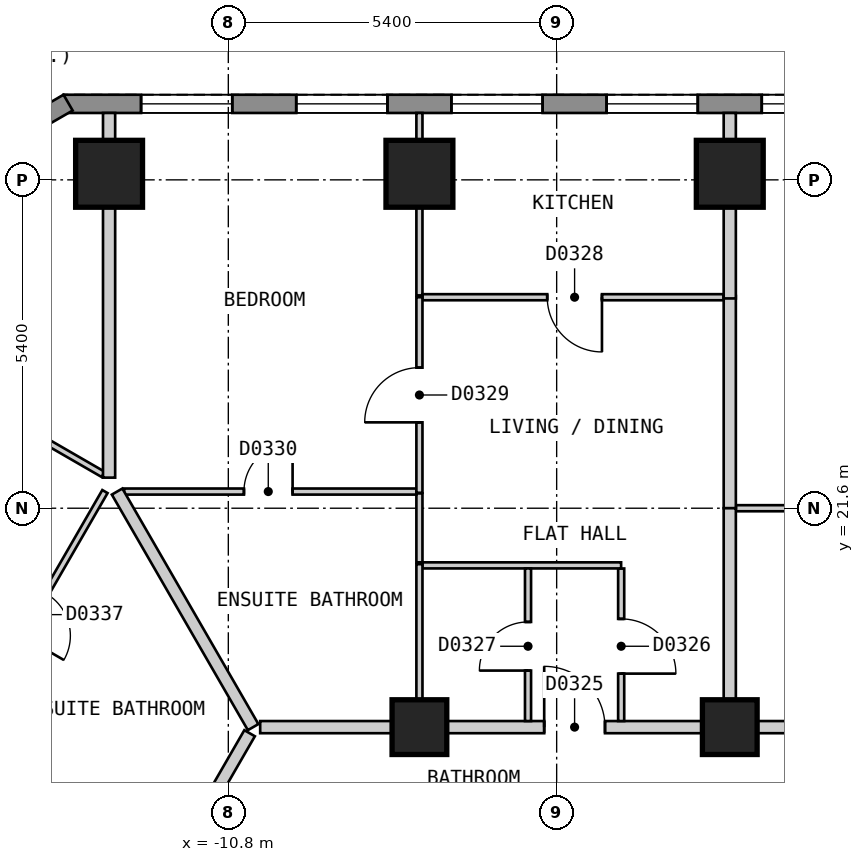
"""IFC4 building model, lengths in metres.
Left out: names, types, materials, properties, quantities, classifications, styles, units other than length and angle.
Written with IfcOpenShell. Run it as: python <this file> out.ifc"""

import sys

from ifc_helpers import new_model, si_unit, direction, frame, frame_2d, origin, origin_2d, place, context, subcontext, project, spatial, polyline, rectangle, outline, extrude, element, fill, save


model = new_model("IFC4")
c1 = context("Model", 3, precision=1e-05, world=origin(), true_north=direction((0.0, 1.0)))
c2 = subcontext(c1, "Body", "Model", "MODEL_VIEW")
j1 = project(units=[si_unit("LENGTHUNIT", "METRE"), si_unit("PLANEANGLEUNIT", "RADIAN")], contexts=[c1])
p1 = place(None, origin())
s1 = spatial("IfcSite", under=j1, at=p1, CompositionType="ELEMENT")
p2 = place(p1, origin())
s2 = spatial("IfcBuilding", under=s1, at=p2, CompositionType="ELEMENT")
p3 = place(p2, frame((0.0, 0.0, 59.4)))
s3 = spatial("IfcBuildingStorey", under=s2, at=p3, CompositionType="ELEMENT", Elevation=59.4)
for number, where, z_axis, x_axis in (
    (1, (-2.553, 27.1, 0.0), (0.0, 0.0, 1.0), (-1.0, 0.0, 0.0)),
    (2, (-7.657, 27.1, 0.0), (0.0, 0.0, 1.0), (-1.0, 0.0, 0.0)),
    (3, (-12.761, 27.1, 0.0), (0.0, 0.0, 1.0), (-1.0, 0.0, 0.0)),
):
    element("IfcColumn", number, at=place(p3, frame(where, z_axis=z_axis, x_axis=x_axis)), inside=s3, PredefinedType="COLUMN", context=c2, shape_type="SweptSolid", body=[
        extrude(rectangle(XDim=1.1, YDim=1.1, at=origin_2d()), origin(), (0.0, 0.0, 1.0), 3.0),
    ])
for number, where, z_axis, x_axis in (
    (4, (-2.553, 18.0, 0.0), (0.0, 0.0, 1.0), (-1.0, 0.0, 0.0)),
    (5, (-7.657, 18.0, 0.0), (0.0, 0.0, 1.0), (-1.0, 0.0, 0.0)),
):
    element("IfcColumn", number, at=place(p3, frame(where, z_axis=z_axis, x_axis=x_axis)), inside=s3, PredefinedType="COLUMN", context=c2, shape_type="SweptSolid", body=[
        extrude(rectangle(XDim=0.9, YDim=0.9, at=origin_2d()), origin(), (0.0, 0.0, 1.0), 3.0),
    ])
p4 = place(p3, frame((13.51, 28.25, 0.0), z_axis=(0.0, 0.0, 1.0), x_axis=(-1.0, 0.0, 0.0)))
e6 = element("IfcWall", 6, at=p4, inside=s3, PredefinedType="SOLIDWALL", context=c2, shape_type="SweptSolid", body=[
    extrude(outline(polyline([(0.0, -0.15), (27.02, -0.15), (26.94, 0.15), (0.08, 0.15), (0.0, -0.15)])), origin(), (0.0, 0.0, 1.0), 2.6),
])
p5 = place(p4, frame((1.277, 0.0, 0.15)))
e7 = element("IfcOpeningElement", 7, at=p5, cuts=e6, PredefinedType="OPENING", context=c2, shape_type="SweptSolid", body=[
    extrude(rectangle(XDim=1.5, YDim=2.1, at=frame_2d((0.75, 1.05))), frame((0.0, 0.16, 0.0), z_axis=(0.0, -1.0, 0.0), x_axis=(1.0, 0.0, 0.0)), (0.0, 0.0, 1.0), 0.32),
])
p6 = place(p4, frame((3.829, 0.0, 0.15)))
e8 = element("IfcOpeningElement", 8, at=p6, cuts=e6, PredefinedType="OPENING", context=c2, shape_type="SweptSolid", body=[
    extrude(rectangle(XDim=1.5, YDim=2.1, at=frame_2d((0.75, 1.05))), frame((0.0, 0.16, 0.0), z_axis=(0.0, -1.0, 0.0), x_axis=(1.0, 0.0, 0.0)), (0.0, 0.0, 1.0), 0.32),
])
p7 = place(p4, frame((6.381, 0.0, 0.15)))
e9 = element("IfcOpeningElement", 9, at=p7, cuts=e6, PredefinedType="OPENING", context=c2, shape_type="SweptSolid", body=[
    extrude(rectangle(XDim=1.5, YDim=2.1, at=frame_2d((0.75, 1.05))), frame((0.0, 0.16, 0.0), z_axis=(0.0, -1.0, 0.0), x_axis=(1.0, 0.0, 0.0)), (0.0, 0.0, 1.0), 0.32),
])
p8 = place(p4, frame((8.933, 0.0, 0.15)))
e10 = element("IfcOpeningElement", 10, at=p8, cuts=e6, PredefinedType="OPENING", context=c2, shape_type="SweptSolid", body=[
    extrude(rectangle(XDim=1.5, YDim=2.1, at=frame_2d((0.75, 1.05))), frame((0.0, 0.16, 0.0), z_axis=(0.0, -1.0, 0.0), x_axis=(1.0, 0.0, 0.0)), (0.0, 0.0, 1.0), 0.32),
])
p9 = place(p4, frame((11.485, 0.0, 0.15)))
e11 = element("IfcOpeningElement", 11, at=p9, cuts=e6, PredefinedType="OPENING", context=c2, shape_type="SweptSolid", body=[
    extrude(rectangle(XDim=1.5, YDim=2.1, at=frame_2d((0.75, 1.05))), frame((0.0, 0.16, 0.0), z_axis=(0.0, -1.0, 0.0), x_axis=(1.0, 0.0, 0.0)), (0.0, 0.0, 1.0), 0.32),
])
p10 = place(p4, frame((14.037, 0.0, 0.15)))
e12 = element("IfcOpeningElement", 12, at=p10, cuts=e6, PredefinedType="OPENING", context=c2, shape_type="SweptSolid", body=[
    extrude(rectangle(XDim=1.5, YDim=2.1, at=frame_2d((0.75, 1.05))), frame((0.0, 0.16, 0.0), z_axis=(0.0, -1.0, 0.0), x_axis=(1.0, 0.0, 0.0)), (0.0, 0.0, 1.0), 0.32),
])
p11 = place(p4, frame((16.589, 0.0, 0.15)))
e13 = element("IfcOpeningElement", 13, at=p11, cuts=e6, PredefinedType="OPENING", context=c2, shape_type="SweptSolid", body=[
    extrude(rectangle(XDim=1.5, YDim=2.1, at=frame_2d((0.75, 1.05))), frame((0.0, 0.16, 0.0), z_axis=(0.0, -1.0, 0.0), x_axis=(1.0, 0.0, 0.0)), (0.0, 0.0, 1.0), 0.32),
])
p12 = place(p4, frame((19.141, 0.0, 0.15)))
e14 = element("IfcOpeningElement", 14, at=p12, cuts=e6, PredefinedType="OPENING", context=c2, shape_type="SweptSolid", body=[
    extrude(rectangle(XDim=1.5, YDim=2.1, at=frame_2d((0.75, 1.05))), frame((0.0, 0.16, 0.0), z_axis=(0.0, -1.0, 0.0), x_axis=(1.0, 0.0, 0.0)), (0.0, 0.0, 1.0), 0.32),
])
p13 = place(p4, frame((21.693, 0.0, 0.15)))
e15 = element("IfcOpeningElement", 15, at=p13, cuts=e6, PredefinedType="OPENING", context=c2, shape_type="SweptSolid", body=[
    extrude(rectangle(XDim=1.5, YDim=2.1, at=frame_2d((0.75, 1.05))), frame((0.0, 0.16, 0.0), z_axis=(0.0, -1.0, 0.0), x_axis=(1.0, 0.0, 0.0)), (0.0, 0.0, 1.0), 0.32),
])
p14 = place(p4, frame((24.245, 0.0, 0.15)))
e16 = element("IfcOpeningElement", 16, at=p14, cuts=e6, PredefinedType="OPENING", context=c2, shape_type="SweptSolid", body=[
    extrude(rectangle(XDim=1.5, YDim=2.1, at=frame_2d((0.75, 1.05))), frame((0.0, 0.16, 0.0), z_axis=(0.0, -1.0, 0.0), x_axis=(1.0, 0.0, 0.0)), (0.0, 0.0, 1.0), 0.32),
])
p15 = place(p3, frame((-13.435, 28.27, 0.0), z_axis=(0.0, 0.0, 1.0), x_axis=(-0.866010750942, -0.50002537861, 0.0)))
e17 = element("IfcWall", 17, at=p15, inside=s3, PredefinedType="SOLIDWALL", context=c2, shape_type="SweptSolid", body=[
    extrude(outline(polyline([(0.0, -0.15), (5.0, -0.15), (4.919, 0.15), (0.08, 0.15), (0.0, -0.15)])), origin(), (0.0, 0.0, 1.0), 2.6),
])
p16 = place(p15, frame((0.65, 0.0, 0.15)))
e18 = element("IfcOpeningElement", 18, at=p16, cuts=e17, PredefinedType="OPENING", context=c2, shape_type="SweptSolid", body=[
    extrude(rectangle(XDim=1.2, YDim=2.1, at=frame_2d((0.6, 1.05))), frame((0.0, 0.16, 0.0), z_axis=(0.0, -1.0, 0.0), x_axis=(1.0, 0.0, 0.0)), (0.0, 0.0, 1.0), 0.32),
])
p17 = place(p15, frame((3.149, 0.0, 0.15)))
e19 = element("IfcOpeningElement", 19, at=p17, cuts=e17, PredefinedType="OPENING", context=c2, shape_type="SweptSolid", body=[
    extrude(rectangle(XDim=1.2, YDim=2.1, at=frame_2d((0.6, 1.05))), frame((0.0, 0.16, 0.0), z_axis=(0.0, -1.0, 0.0), x_axis=(1.0, 0.0, 0.0)), (0.0, 0.0, 1.0), 0.32),
])
p18 = place(p3, frame((-10.276, 18.0, 0.0), z_axis=(0.0, 0.0, 1.0), x_axis=(1.0, 0.0, 0.0)))
e20 = element("IfcWall", 20, at=p18, inside=s3, PredefinedType="PARTITIONING", context=c2, shape_type="SweptSolid", body=[
    extrude(rectangle(XDim=20.5, YDim=0.2, at=frame_2d((10.25, 0.0))), origin(), (0.0, 0.0, 1.0), 2.6),
])
p19 = place(p18, frame((19.264, 0.0, 0.0)))
e21 = element("IfcOpeningElement", 21, at=p19, cuts=e20, PredefinedType="OPENING", context=c2, shape_type="SweptSolid", body=[
    extrude(rectangle(XDim=1.0, YDim=2.1, at=frame_2d((0.5, 1.05))), frame((0.0, 0.11, 0.0), z_axis=(0.0, -1.0, 0.0), x_axis=(1.0, 0.0, 0.0)), (0.0, 0.0, 1.0), 0.22),
])
p20 = place(p18, frame((14.879, 0.0, 0.0)))
e22 = element("IfcOpeningElement", 22, at=p20, cuts=e20, PredefinedType="OPENING", context=c2, shape_type="SweptSolid", body=[
    extrude(rectangle(XDim=1.0, YDim=2.1, at=frame_2d((0.5, 1.05))), frame((0.0, 0.11, 0.0), z_axis=(0.0, -1.0, 0.0), x_axis=(1.0, 0.0, 0.0)), (0.0, 0.0, 1.0), 0.22),
])
p21 = place(p18, frame((4.671, 0.0, 0.0)))
e23 = element("IfcOpeningElement", 23, at=p21, cuts=e20, PredefinedType="OPENING", context=c2, shape_type="SweptSolid", body=[
    extrude(rectangle(XDim=1.0, YDim=2.1, at=frame_2d((0.5, 1.05))), frame((0.0, 0.11, 0.0), z_axis=(0.0, -1.0, 0.0), x_axis=(1.0, 0.0, 0.0)), (0.0, 0.0, 1.0), 0.22),
])
p22 = place(p3, frame((-20.727, 0.099, 0.0), z_axis=(0.0, 0.0, 1.0), x_axis=(0.499993204491, 0.866029327138, 0.0)))
e24 = element("IfcWall", 24, at=p22, inside=s3, PredefinedType="PARTITIONING", context=c2, shape_type="SweptSolid", body=[
    extrude(rectangle(XDim=20.554, YDim=0.2, at=frame_2d((10.277, 0.0))), origin(), (0.0, 0.0, 1.0), 2.6),
])
p23 = place(p22, frame((14.88, 0.0, 0.0)))
e25 = element("IfcOpeningElement", 25, at=p23, cuts=e24, PredefinedType="OPENING", context=c2, shape_type="SweptSolid", body=[
    extrude(rectangle(XDim=1.0, YDim=2.1, at=frame_2d((0.5, 1.05))), frame((0.0, 0.11, 0.0), z_axis=(0.0, -1.0, 0.0), x_axis=(1.0, 0.0, 0.0)), (0.0, 0.0, 1.0), 0.22),
])
p24 = place(p22, frame((4.673, 0.0, 0.0)))
e26 = element("IfcOpeningElement", 26, at=p24, cuts=e24, PredefinedType="OPENING", context=c2, shape_type="SweptSolid", body=[
    extrude(rectangle(XDim=1.0, YDim=2.1, at=frame_2d((0.5, 1.05))), frame((0.0, 0.11, 0.0), z_axis=(0.0, -1.0, 0.0), x_axis=(1.0, 0.0, 0.0)), (0.0, 0.0, 1.0), 0.22),
])
p25 = place(p22, frame((0.838, 0.0, 0.0)))
e27 = element("IfcOpeningElement", 27, at=p25, cuts=e24, PredefinedType="OPENING", context=c2, shape_type="SweptSolid", body=[
    extrude(rectangle(XDim=0.8, YDim=2.1, at=frame_2d((0.4, 1.05))), frame((0.0, 0.11, 0.0), z_axis=(0.0, -1.0, 0.0), x_axis=(1.0, 0.0, 0.0)), (0.0, 0.0, 1.0), 0.22),
])
p26 = place(p3, frame((-4.339, 20.609, 0.0), z_axis=(0.0, 0.0, 1.0), x_axis=(0.0, -1.0, 0.0)))
e28 = element("IfcWall", 28, at=p26, inside=s3, PredefinedType="PARTITIONING", context=c2, shape_type="SweptSolid", body=[
    extrude(rectangle(XDim=2.509, YDim=0.1, at=frame_2d((1.254, 0.0))), origin(), (0.0, 0.0, 1.0), 2.6),
])
p27 = place(p26, frame((0.829, 0.0, 0.0)))
e29 = element("IfcOpeningElement", 29, at=p27, cuts=e28, PredefinedType="OPENING", context=c2, shape_type="SweptSolid", body=[
    extrude(rectangle(XDim=0.9, YDim=2.1, at=frame_2d((0.45, 1.05))), frame((0.0, 0.06, 0.0), z_axis=(0.0, -1.0, 0.0), x_axis=(1.0, 0.0, 0.0)), (0.0, 0.0, 1.0), 0.12),
])
p28 = place(p3, frame((-7.657, 28.1, 0.0), z_axis=(0.0, 0.0, 1.0), x_axis=(0.0, -1.0, 0.0)))
e30 = element("IfcWall", 30, at=p28, inside=s3, PredefinedType="PARTITIONING", context=c2, shape_type="SweptSolid", body=[
    extrude(rectangle(XDim=3.0, YDim=0.1, at=frame_2d((1.5, 0.0))), origin(), (0.0, 0.0, 1.0), 2.6),
])
p29 = place(p3, frame((-7.657, 21.844, 0.0), z_axis=(0.0, 0.0, 1.0), x_axis=(0.0, -1.0, 0.0)))
e31 = element("IfcWall", 31, at=p29, inside=s3, PredefinedType="PARTITIONING", context=c2, shape_type="SweptSolid", body=[
    extrude(rectangle(XDim=1.134, YDim=0.1, at=frame_2d((0.567, 0.0))), origin(), (0.0, 0.0, 1.0), 2.6),
])
p30 = place(p3, frame((-20.508, 20.679, 0.0), z_axis=(0.0, 0.0, 1.0), x_axis=(0.866047370643, -0.499961950354, 0.0)))
e32 = element("IfcWall", 32, at=p30, inside=s3, PredefinedType="PARTITIONING", context=c2, shape_type="SweptSolid", body=[
    extrude(rectangle(XDim=10.001, YDim=0.1, at=frame_2d((5.0, 0.0))), origin(), (0.0, 0.0, 1.0), 2.6),
])
p31 = place(p30, frame((2.576, 0.0, 0.0)))
e33 = element("IfcOpeningElement", 33, at=p31, cuts=e32, PredefinedType="OPENING", context=c2, shape_type="SweptSolid", body=[
    extrude(rectangle(XDim=0.9, YDim=2.1, at=frame_2d((0.45, 1.05))), frame((0.0, 0.06, 0.0), z_axis=(0.0, -1.0, 0.0), x_axis=(1.0, 0.0, 0.0)), (0.0, 0.0, 1.0), 0.12),
])
p32 = place(p3, frame((-17.955, 25.099, 0.0), z_axis=(0.0, 0.0, 1.0), x_axis=(0.866036353684, -0.499981033738, 0.0)))
e34 = element("IfcWall", 34, at=p32, inside=s3, PredefinedType="PARTITIONING", context=c2, shape_type="SweptSolid", body=[
    extrude(rectangle(XDim=5.885, YDim=0.1, at=frame_2d((2.942, 0.0))), origin(), (0.0, 0.0, 1.0), 2.6),
])
p33 = place(p32, frame((2.55, 0.0, 0.0)))
e35 = element("IfcOpeningElement", 35, at=p33, cuts=e34, PredefinedType="OPENING", context=c2, shape_type="SweptSolid", body=[
    extrude(rectangle(XDim=0.9, YDim=2.1, at=frame_2d((0.45, 1.05))), frame((0.0, 0.06, 0.0), z_axis=(0.0, -1.0, 0.0), x_axis=(1.0, 0.0, 0.0)), (0.0, 0.0, 1.0), 0.12),
])
p34 = place(p3, frame((-7.607, 20.66, 0.0), z_axis=(0.0, 0.0, 1.0), x_axis=(1.0, 0.0, 0.0)))
e36 = element("IfcWall", 36, at=p34, inside=s3, PredefinedType="PARTITIONING", context=c2, shape_type="SweptSolid", body=[
    extrude(rectangle(XDim=3.267, YDim=0.1, at=frame_2d((1.633, 0.0))), origin(), (0.0, 0.0, 1.0), 2.6),
])
p35 = place(p3, frame((-2.453, 21.6, 0.0), z_axis=(0.0, 0.0, 1.0), x_axis=(1.0, 0.0, 0.0)))
e37 = element("IfcWall", 37, at=p35, inside=s3, PredefinedType="PARTITIONING", context=c2, shape_type="SweptSolid", body=[
    extrude(rectangle(XDim=4.954, YDim=0.1, at=frame_2d((2.477, 0.0))), origin(), (0.0, 0.0, 1.0), 2.6),
])
p36 = place(p35, frame((2.052, 0.0, 0.0)))
e38 = element("IfcOpeningElement", 38, at=p36, cuts=e37, PredefinedType="OPENING", context=c2, shape_type="SweptSolid", body=[
    extrude(rectangle(XDim=0.8, YDim=2.1, at=frame_2d((0.4, 1.05))), frame((0.0, 0.06, 0.0), z_axis=(0.0, -1.0, 0.0), x_axis=(1.0, 0.0, 0.0)), (0.0, 0.0, 1.0), 0.12),
])
p37 = place(p3, frame((-12.513, 21.874, 0.0), z_axis=(0.0, 0.0, 1.0), x_axis=(1.0, 0.0, 0.0)))
e39 = element("IfcWall", 39, at=p37, inside=s3, PredefinedType="PARTITIONING", context=c2, shape_type="SweptSolid", body=[
    extrude(rectangle(XDim=4.806, YDim=0.1, at=frame_2d((2.403, 0.0))), origin(), (0.0, 0.0, 1.0), 2.6),
])
p38 = place(p37, frame((1.97, 0.0, 0.0)))
e40 = element("IfcOpeningElement", 40, at=p38, cuts=e39, PredefinedType="OPENING", context=c2, shape_type="SweptSolid", body=[
    extrude(rectangle(XDim=0.8, YDim=2.1, at=frame_2d((0.4, 1.05))), frame((0.0, 0.06, 0.0), z_axis=(0.0, -1.0, 0.0), x_axis=(1.0, 0.0, 0.0)), (0.0, 0.0, 1.0), 0.12),
])
p39 = place(p3, frame((-7.607, 25.07, 0.0), z_axis=(0.0, 0.0, 1.0), x_axis=(1.0, 0.0, 0.0)))
e41 = element("IfcWall", 41, at=p39, inside=s3, PredefinedType="PARTITIONING", context=c2, shape_type="SweptSolid", body=[
    extrude(rectangle(XDim=4.954, YDim=0.1, at=frame_2d((2.477, 0.0))), origin(), (0.0, 0.0, 1.0), 2.6),
])
p40 = place(p39, frame((2.052, 0.0, 0.0)))
e42 = element("IfcOpeningElement", 42, at=p40, cuts=e41, PredefinedType="OPENING", context=c2, shape_type="SweptSolid", body=[
    extrude(rectangle(XDim=0.9, YDim=2.1, at=frame_2d((0.45, 1.05))), frame((0.0, 0.06, 0.0), z_axis=(0.0, -1.0, 0.0), x_axis=(1.0, 0.0, 0.0)), (0.0, 0.0, 1.0), 0.12),
])
p41 = place(p3, frame((-5.871, 18.1, 0.0), z_axis=(0.0, 0.0, 1.0), x_axis=(0.0, 1.0, 0.0)))
e43 = element("IfcWall", 43, at=p41, inside=s3, PredefinedType="PARTITIONING", context=c2, shape_type="SweptSolid", body=[
    extrude(rectangle(XDim=2.51, YDim=0.1, at=frame_2d((1.255, 0.0))), origin(), (0.0, 0.0, 1.0), 2.6),
])
p42 = place(p41, frame((0.83, 0.0, 0.0)))
e44 = element("IfcOpeningElement", 44, at=p42, cuts=e43, PredefinedType="OPENING", context=c2, shape_type="SweptSolid", body=[
    extrude(rectangle(XDim=0.8, YDim=2.1, at=frame_2d((0.4, 1.05))), frame((0.0, 0.06, 0.0), z_axis=(0.0, -1.0, 0.0), x_axis=(1.0, 0.0, 0.0)), (0.0, 0.0, 1.0), 0.12),
])
p43 = place(p3, frame((-7.657, 18.1, 0.0), z_axis=(0.0, 0.0, 1.0), x_axis=(0.0, 1.0, 0.0)))
e45 = element("IfcWall", 45, at=p43, inside=s3, PredefinedType="PARTITIONING", context=c2, shape_type="SweptSolid", body=[
    extrude(rectangle(XDim=2.58, YDim=0.1, at=frame_2d((1.29, 0.0))), origin(), (0.0, 0.0, 1.0), 2.6),
])
p44 = place(p3, frame((-7.657, 21.854, 0.0), z_axis=(0.0, 0.0, 1.0), x_axis=(0.0, 1.0, 0.0)))
e46 = element("IfcWall", 46, at=p44, inside=s3, PredefinedType="PARTITIONING", context=c2, shape_type="SweptSolid", body=[
    extrude(rectangle(XDim=3.216, YDim=0.1, at=frame_2d((1.608, 0.0))), origin(), (0.0, 0.0, 1.0), 2.6),
])
p45 = place(p44, frame((1.158, 0.0, 0.0)))
e47 = element("IfcOpeningElement", 47, at=p45, cuts=e46, PredefinedType="OPENING", context=c2, shape_type="SweptSolid", body=[
    extrude(rectangle(XDim=0.9, YDim=2.1, at=frame_2d((0.45, 1.05))), frame((0.0, 0.06, 0.0), z_axis=(0.0, -1.0, 0.0), x_axis=(1.0, 0.0, 0.0)), (0.0, 0.0, 1.0), 0.12),
])
p46 = place(p3, frame((-12.629, 21.874, 0.0), z_axis=(0.0, 0.0, 1.0), x_axis=(0.500024801635, -0.86601108408, 0.0)))
e48 = element("IfcWall", 48, at=p46, inside=s3, PredefinedType="PARTITIONING", context=c2, shape_type="SweptSolid", body=[
    extrude(rectangle(XDim=4.473, YDim=0.2, at=frame_2d((2.237, 0.0))), origin(), (0.0, 0.0, 1.0), 2.6),
])
p47 = place(p3, frame((-2.553, 25.09, 0.0), z_axis=(0.0, 0.0, 1.0), x_axis=(0.0, -1.0, 0.0)))
e49 = element("IfcWall", 49, at=p47, inside=s3, PredefinedType="PARTITIONING", context=c2, shape_type="SweptSolid", body=[
    extrude(rectangle(XDim=3.49, YDim=0.2, at=frame_2d((1.745, 0.0))), origin(), (0.0, 0.0, 1.0), 2.6),
])
p48 = place(p3, frame((-12.761, 22.103, 0.0), z_axis=(0.0, 0.0, 1.0), x_axis=(0.0, 1.0, 0.0)))
e50 = element("IfcWall", 50, at=p48, inside=s3, PredefinedType="PARTITIONING", context=c2, shape_type="SweptSolid", body=[
    extrude(rectangle(XDim=5.997, YDim=0.2, at=frame_2d((2.999, 0.0))), origin(), (0.0, 0.0, 1.0), 2.6),
])
p49 = place(p3, frame((-2.553, 18.1, 0.0), z_axis=(0.0, 0.0, 1.0), x_axis=(0.0, 1.0, 0.0)))
e51 = element("IfcWall", 51, at=p49, inside=s3, PredefinedType="PARTITIONING", context=c2, shape_type="SweptSolid", body=[
    extrude(rectangle(XDim=3.5, YDim=0.2, at=frame_2d((1.75, 0.0))), origin(), (0.0, 0.0, 1.0), 2.6),
])
p50 = place(p3, frame((-2.553, 25.05, 0.0), z_axis=(0.0, 0.0, 1.0), x_axis=(0.0, 1.0, 0.0)))
e52 = element("IfcWall", 52, at=p50, inside=s3, PredefinedType="PARTITIONING", context=c2, shape_type="SweptSolid", body=[
    extrude(rectangle(XDim=3.05, YDim=0.2, at=frame_2d((1.525, 0.0))), origin(), (0.0, 0.0, 1.0), 2.6),
])
p51 = place(p3, frame((-15.266, 17.653, 0.0), z_axis=(0.0, 0.0, 1.0), x_axis=(0.500007182864, 0.866021256716, 0.0)))
e53 = element("IfcWall", 53, at=p51, inside=s3, PredefinedType="PARTITIONING", context=c2, shape_type="SweptSolid", body=[
    extrude(rectangle(XDim=4.874, YDim=0.1, at=frame_2d((2.437, 0.0))), origin(), (0.0, 0.0, 1.0), 2.6),
])
p52 = place(p51, frame((2.137, 0.0, 0.0)))
e54 = element("IfcOpeningElement", 54, at=p52, cuts=e53, PredefinedType="OPENING", context=c2, shape_type="SweptSolid", body=[
    extrude(rectangle(XDim=0.8, YDim=2.1, at=frame_2d((0.4, 1.05))), frame((0.0, 0.06, 0.0), z_axis=(0.0, -1.0, 0.0), x_axis=(1.0, 0.0, 0.0)), (0.0, 0.0, 1.0), 0.12),
])
p53 = place(p10, origin())
e55 = element("IfcWindow", 55, at=p53, inside=s3, PartitioningType="SINGLE_PANEL", PredefinedType="WINDOW", context=c2, shape_type="SweptSolid", body=[
    extrude(rectangle(XDim=1.5, YDim=2.1, at=frame_2d((0.75, 1.05))), frame((0.0, 0.03, 0.0), z_axis=(0.0, -1.0, 0.0), x_axis=(1.0, 0.0, 0.0)), (0.0, 0.0, 1.0), 0.06),
])
fill(e12, e55)
p54 = place(p11, origin())
e56 = element("IfcWindow", 56, at=p54, inside=s3, PartitioningType="SINGLE_PANEL", PredefinedType="WINDOW", context=c2, shape_type="SweptSolid", body=[
    extrude(rectangle(XDim=1.5, YDim=2.1, at=frame_2d((0.75, 1.05))), frame((0.0, 0.03, 0.0), z_axis=(0.0, -1.0, 0.0), x_axis=(1.0, 0.0, 0.0)), (0.0, 0.0, 1.0), 0.06),
])
fill(e13, e56)
p55 = place(p12, origin())
e57 = element("IfcWindow", 57, at=p55, inside=s3, PartitioningType="SINGLE_PANEL", PredefinedType="WINDOW", context=c2, shape_type="SweptSolid", body=[
    extrude(rectangle(XDim=1.5, YDim=2.1, at=frame_2d((0.75, 1.05))), frame((0.0, 0.03, 0.0), z_axis=(0.0, -1.0, 0.0), x_axis=(1.0, 0.0, 0.0)), (0.0, 0.0, 1.0), 0.06),
])
fill(e14, e57)
p56 = place(p13, origin())
e58 = element("IfcWindow", 58, at=p56, inside=s3, PartitioningType="SINGLE_PANEL", PredefinedType="WINDOW", context=c2, shape_type="SweptSolid", body=[
    extrude(rectangle(XDim=1.5, YDim=2.1, at=frame_2d((0.75, 1.05))), frame((0.0, 0.03, 0.0), z_axis=(0.0, -1.0, 0.0), x_axis=(1.0, 0.0, 0.0)), (0.0, 0.0, 1.0), 0.06),
])
fill(e15, e58)
p57 = place(p14, origin())
e59 = element("IfcWindow", 59, at=p57, inside=s3, PartitioningType="SINGLE_PANEL", PredefinedType="WINDOW", context=c2, shape_type="SweptSolid", body=[
    extrude(rectangle(XDim=1.5, YDim=2.1, at=frame_2d((0.75, 1.05))), frame((0.0, 0.03, 0.0), z_axis=(0.0, -1.0, 0.0), x_axis=(1.0, 0.0, 0.0)), (0.0, 0.0, 1.0), 0.06),
])
fill(e16, e59)
p58 = place(p21, origin())
e60 = element("IfcDoor", 60, at=p58, inside=s3, OperationType="SINGLE_SWING_LEFT", PredefinedType="DOOR", context=c2, shape_type="SweptSolid", body=[
    extrude(rectangle(XDim=1.0, YDim=2.1, at=frame_2d((0.5, 1.05))), frame((0.0, 0.025, 0.0), z_axis=(0.0, -1.0, 0.0), x_axis=(1.0, 0.0, 0.0)), (0.0, 0.0, 1.0), 0.05),
])
fill(e23, e60)
p59 = place(p27, origin())
e61 = element("IfcDoor", 61, at=p59, inside=s3, OperationType="SINGLE_SWING_RIGHT", PredefinedType="DOOR", context=c2, shape_type="SweptSolid", body=[
    extrude(rectangle(XDim=0.9, YDim=2.1, at=frame_2d((0.45, 1.05))), frame((0.0, 0.025, 0.0), z_axis=(0.0, -1.0, 0.0), x_axis=(1.0, 0.0, 0.0)), (0.0, 0.0, 1.0), 0.05),
])
fill(e29, e61)
p60 = place(p42, origin())
e62 = element("IfcDoor", 62, at=p60, inside=s3, OperationType="SINGLE_SWING_LEFT", PredefinedType="DOOR", context=c2, shape_type="SweptSolid", body=[
    extrude(rectangle(XDim=0.8, YDim=2.1, at=frame_2d((0.4, 1.05))), frame((0.0, 0.025, 0.0), z_axis=(0.0, -1.0, 0.0), x_axis=(1.0, 0.0, 0.0)), (0.0, 0.0, 1.0), 0.05),
])
fill(e44, e62)
p61 = place(p40, origin())
e63 = element("IfcDoor", 63, at=p61, inside=s3, OperationType="SINGLE_SWING_RIGHT", PredefinedType="DOOR", context=c2, shape_type="SweptSolid", body=[
    extrude(rectangle(XDim=0.9, YDim=2.1, at=frame_2d((0.45, 1.05))), frame((0.0, 0.025, 0.0), z_axis=(0.0, -1.0, 0.0), x_axis=(1.0, 0.0, 0.0)), (0.0, 0.0, 1.0), 0.05),
])
fill(e42, e63)
p62 = place(p45, origin())
e64 = element("IfcDoor", 64, at=p62, inside=s3, OperationType="SINGLE_SWING_LEFT", PredefinedType="DOOR", context=c2, shape_type="SweptSolid", body=[
    extrude(rectangle(XDim=0.9, YDim=2.1, at=frame_2d((0.45, 1.05))), frame((0.0, 0.025, 0.0), z_axis=(0.0, -1.0, 0.0), x_axis=(1.0, 0.0, 0.0)), (0.0, 0.0, 1.0), 0.05),
])
fill(e47, e64)
p63 = place(p38, origin())
e65 = element("IfcDoor", 65, at=p63, inside=s3, OperationType="SINGLE_SWING_RIGHT", PredefinedType="DOOR", context=c2, shape_type="SweptSolid", body=[
    extrude(rectangle(XDim=0.8, YDim=2.1, at=frame_2d((0.4, 1.05))), frame((0.0, 0.025, 0.0), z_axis=(0.0, -1.0, 0.0), x_axis=(1.0, 0.0, 0.0)), (0.0, 0.0, 1.0), 0.05),
])
fill(e40, e65)
save(model, sys.argv[1])
